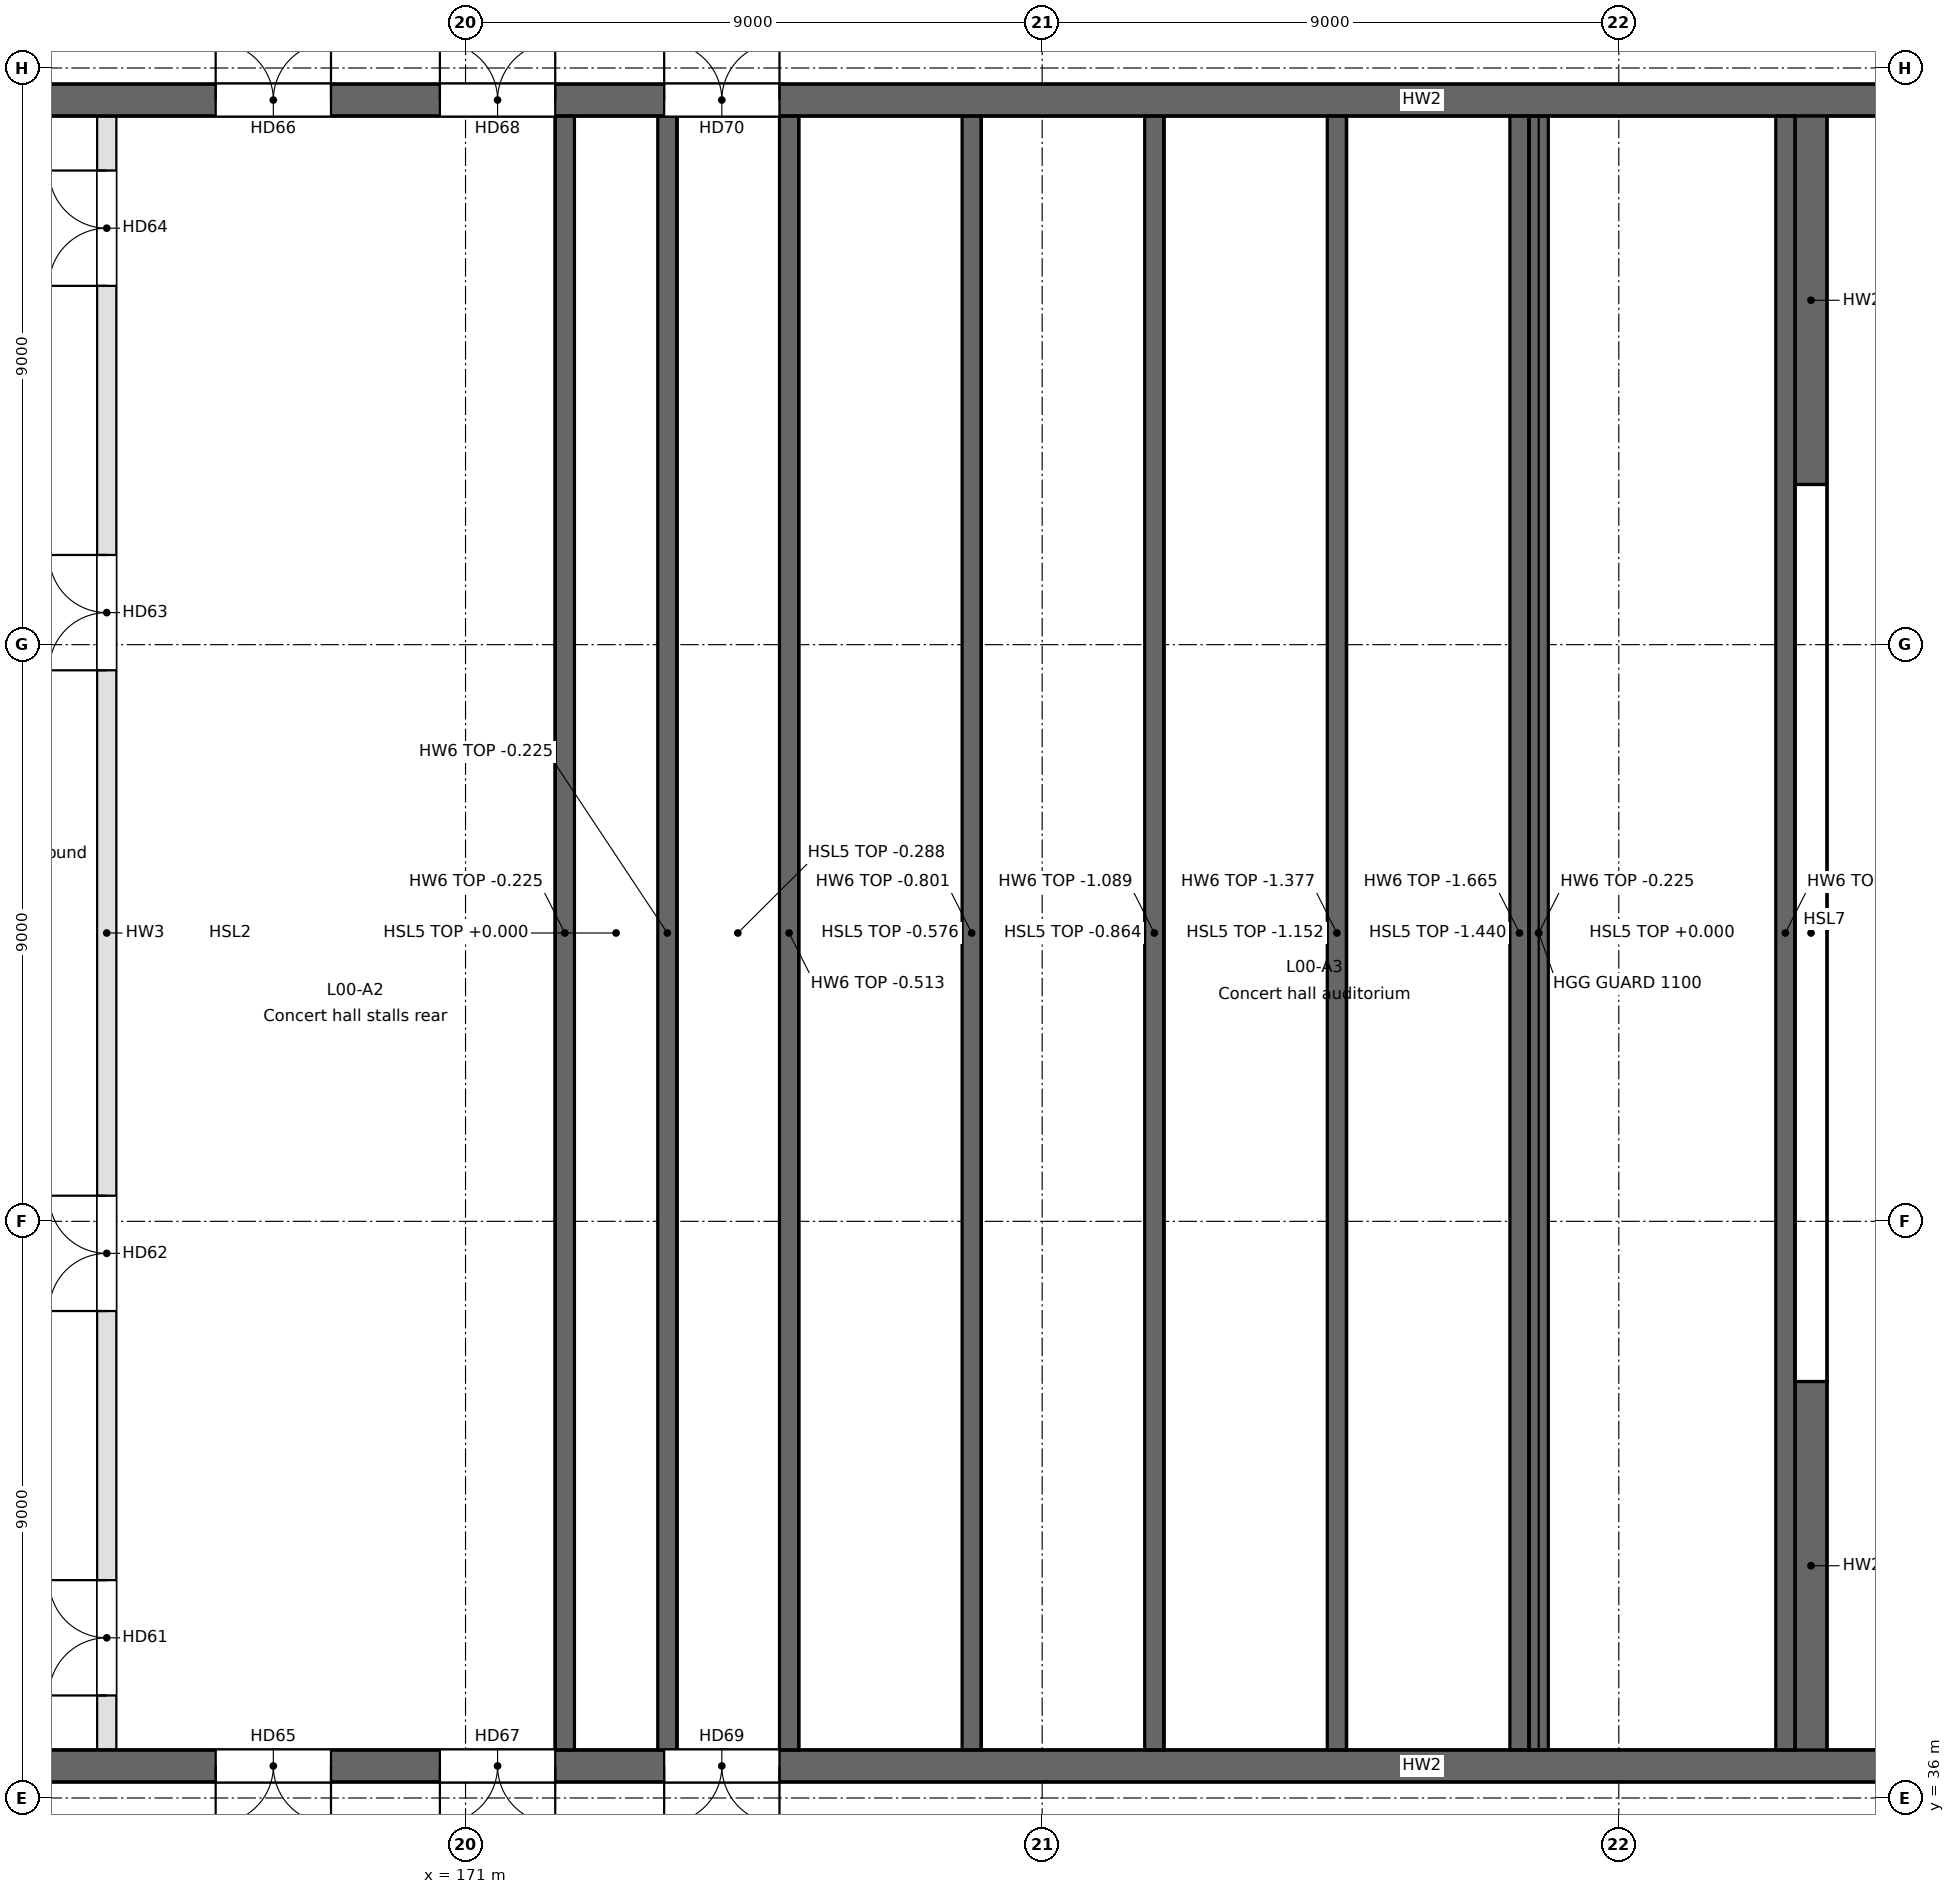
"""IFC4 building model, lengths in metres.
Left out: names, types, materials, properties, quantities, classifications, styles, units other than length and angle.
Written with IfcOpenShell. Run it as: python <this file> out.ifc"""

import sys

from ifc_helpers import new_model, si_unit, direction, frame, frame_2d, origin, place, context, subcontext, project, spatial, rectangle, extrude, element, fill, save


model = new_model("IFC4")
c1 = context("Model", 3, precision=1e-05, world=origin(), true_north=direction((0.0, 1.0)))
c2 = subcontext(c1, "Body", "Model", "MODEL_VIEW")
j1 = project(units=[si_unit("LENGTHUNIT", "METRE"), si_unit("PLANEANGLEUNIT", "RADIAN")], contexts=[c1])
p1 = place(None, origin())
s1 = spatial("IfcSite", under=j1, at=p1, CompositionType="ELEMENT")
p2 = place(p1, origin())
s2 = spatial("IfcBuilding", under=s1, at=p2, CompositionType="ELEMENT")
p3 = place(p2, origin())
s3 = spatial("IfcBuildingStorey", under=s2, at=p3, CompositionType="ELEMENT", Elevation=0.0)
p4 = place(p3, frame((209.6, 36.5, -1.8), z_axis=(0.0, 0.0, 1.0), x_axis=(-1.0, 0.0, 0.0)))
e1 = element("IfcWall", 1, at=p4, inside=s3, PredefinedType="SOLIDWALL", context=c2, shape_type="SweptSolid", body=[
    extrude(rectangle(XDim=47.35, YDim=0.5, at=frame_2d((23.675, 0.0))), origin(), (0.0, 0.0, 1.0), 7.45),
])
p5 = place(p4, frame((40.7, 0.0, 1.8)))
e2 = element("IfcOpeningElement", 2, at=p5, cuts=e1, PredefinedType="OPENING", context=c2, shape_type="SweptSolid", body=[
    extrude(rectangle(XDim=1.8, YDim=2.4, at=frame_2d((0.9, 1.2))), frame((0.0, 0.25, 0.0), z_axis=(0.0, -1.0, 0.0), x_axis=(1.0, 0.0, 0.0)), (0.0, 0.0, 1.0), 0.5),
])
p6 = place(p4, frame((37.2, 0.0, 1.8)))
e3 = element("IfcOpeningElement", 3, at=p6, cuts=e1, PredefinedType="OPENING", context=c2, shape_type="SweptSolid", body=[
    extrude(rectangle(XDim=1.8, YDim=2.4, at=frame_2d((0.9, 1.2))), frame((0.0, 0.25, 0.0), z_axis=(0.0, -1.0, 0.0), x_axis=(1.0, 0.0, 0.0)), (0.0, 0.0, 1.0), 0.5),
])
p7 = place(p4, frame((33.7, 0.0, 1.8)))
e4 = element("IfcOpeningElement", 4, at=p7, cuts=e1, PredefinedType="OPENING", context=c2, shape_type="SweptSolid", body=[
    extrude(rectangle(XDim=1.8, YDim=2.4, at=frame_2d((0.9, 1.2))), frame((0.0, 0.25, 0.0), z_axis=(0.0, -1.0, 0.0), x_axis=(1.0, 0.0, 0.0)), (0.0, 0.0, 1.0), 0.5),
])
p8 = place(p4, frame((12.7, 0.0, 1.8)))
e5 = element("IfcOpeningElement", 5, at=p8, cuts=e1, PredefinedType="OPENING", context=c2, shape_type="SweptSolid", body=[
    extrude(rectangle(XDim=1.8, YDim=2.1, at=frame_2d((0.9, 1.05))), frame((0.0, 0.25, 0.0), z_axis=(0.0, -1.0, 0.0), x_axis=(1.0, 0.0, 0.0)), (0.0, 0.0, 1.0), 0.5),
])
p9 = place(p4, frame((4.7, 0.0, 1.8)))
e6 = element("IfcOpeningElement", 6, at=p9, cuts=e1, PredefinedType="OPENING", context=c2, shape_type="SweptSolid", body=[
    extrude(rectangle(XDim=1.8, YDim=2.1, at=frame_2d((0.9, 1.05))), frame((0.0, 0.25, 0.0), z_axis=(0.0, -1.0, 0.0), x_axis=(1.0, 0.0, 0.0)), (0.0, 0.0, 1.0), 0.5),
])
p10 = place(p3, frame((162.25, 62.5, -1.8), z_axis=(0.0, 0.0, 1.0), x_axis=(1.0, 0.0, 0.0)))
e7 = element("IfcWall", 7, at=p10, inside=s3, PredefinedType="SOLIDWALL", context=c2, shape_type="SweptSolid", body=[
    extrude(rectangle(XDim=47.35, YDim=0.5, at=frame_2d((23.675, 0.0))), origin(), (0.0, 0.0, 1.0), 7.45),
])
p11 = place(p10, frame((4.85, 0.0, 1.8)))
e8 = element("IfcOpeningElement", 8, at=p11, cuts=e7, PredefinedType="OPENING", context=c2, shape_type="SweptSolid", body=[
    extrude(rectangle(XDim=1.8, YDim=2.4, at=frame_2d((0.9, 1.2))), frame((0.0, 0.25, 0.0), z_axis=(0.0, -1.0, 0.0), x_axis=(1.0, 0.0, 0.0)), (0.0, 0.0, 1.0), 0.5),
])
p12 = place(p10, frame((8.35, 0.0, 1.8)))
e9 = element("IfcOpeningElement", 9, at=p12, cuts=e7, PredefinedType="OPENING", context=c2, shape_type="SweptSolid", body=[
    extrude(rectangle(XDim=1.8, YDim=2.4, at=frame_2d((0.9, 1.2))), frame((0.0, 0.25, 0.0), z_axis=(0.0, -1.0, 0.0), x_axis=(1.0, 0.0, 0.0)), (0.0, 0.0, 1.0), 0.5),
])
p13 = place(p10, frame((11.85, 0.0, 1.8)))
e10 = element("IfcOpeningElement", 10, at=p13, cuts=e7, PredefinedType="OPENING", context=c2, shape_type="SweptSolid", body=[
    extrude(rectangle(XDim=1.8, YDim=2.4, at=frame_2d((0.9, 1.2))), frame((0.0, 0.25, 0.0), z_axis=(0.0, -1.0, 0.0), x_axis=(1.0, 0.0, 0.0)), (0.0, 0.0, 1.0), 0.5),
])
p14 = place(p10, frame((32.85, 0.0, 1.8)))
e11 = element("IfcOpeningElement", 11, at=p14, cuts=e7, PredefinedType="OPENING", context=c2, shape_type="SweptSolid", body=[
    extrude(rectangle(XDim=1.8, YDim=2.1, at=frame_2d((0.9, 1.05))), frame((0.0, 0.25, 0.0), z_axis=(0.0, -1.0, 0.0), x_axis=(1.0, 0.0, 0.0)), (0.0, 0.0, 1.0), 0.5),
])
p15 = place(p10, frame((40.85, 0.0, 1.8)))
e12 = element("IfcOpeningElement", 12, at=p15, cuts=e7, PredefinedType="OPENING", context=c2, shape_type="SweptSolid", body=[
    extrude(rectangle(XDim=1.8, YDim=2.1, at=frame_2d((0.9, 1.05))), frame((0.0, 0.25, 0.0), z_axis=(0.0, -1.0, 0.0), x_axis=(1.0, 0.0, 0.0)), (0.0, 0.0, 1.0), 0.5),
])
for number, where, z_axis, x_axis in (
    (13, (192.0, 36.75, -1.8), (0.0, 0.0, 1.0), (0.0, 1.0, 0.0)),
    (14, (192.0, 56.5, -1.8), (0.0, 0.0, 1.0), (0.0, 1.0, 0.0)),
):
    element("IfcWall", number, at=place(p3, frame(where, z_axis=z_axis, x_axis=x_axis)), inside=s3, PredefinedType="SOLIDWALL", context=c2, shape_type="SweptSolid", body=[
        extrude(rectangle(XDim=5.75, YDim=0.5, at=frame_2d((2.875, 0.0))), origin(), (0.0, 0.0, 1.0), 7.45),
    ])
p16 = place(p3, frame((165.4, 36.75, 0.0), z_axis=(0.0, 0.0, 1.0), x_axis=(0.0, 1.0, 0.0)))
e15 = element("IfcWall", 15, at=p16, inside=s3, PredefinedType="PARTITIONING", context=c2, shape_type="SweptSolid", body=[
    extrude(rectangle(XDim=25.5, YDim=0.3, at=frame_2d((12.75, 0.0))), origin(), (0.0, 0.0, 1.0), 5.65),
])
p17 = place(p16, frame((0.85, 0.0, 0.0)))
e16 = element("IfcOpeningElement", 16, at=p17, cuts=e15, PredefinedType="OPENING", context=c2, shape_type="SweptSolid", body=[
    extrude(rectangle(XDim=1.8, YDim=2.4, at=frame_2d((0.9, 1.2))), frame((0.0, 0.15, 0.0), z_axis=(0.0, -1.0, 0.0), x_axis=(1.0, 0.0, 0.0)), (0.0, 0.0, 1.0), 0.3),
])
p18 = place(p16, frame((6.85, 0.0, 0.0)))
e17 = element("IfcOpeningElement", 17, at=p18, cuts=e15, PredefinedType="OPENING", context=c2, shape_type="SweptSolid", body=[
    extrude(rectangle(XDim=1.8, YDim=2.4, at=frame_2d((0.9, 1.2))), frame((0.0, 0.15, 0.0), z_axis=(0.0, -1.0, 0.0), x_axis=(1.0, 0.0, 0.0)), (0.0, 0.0, 1.0), 0.3),
])
p19 = place(p16, frame((16.85, 0.0, 0.0)))
e18 = element("IfcOpeningElement", 18, at=p19, cuts=e15, PredefinedType="OPENING", context=c2, shape_type="SweptSolid", body=[
    extrude(rectangle(XDim=1.8, YDim=2.4, at=frame_2d((0.9, 1.2))), frame((0.0, 0.15, 0.0), z_axis=(0.0, -1.0, 0.0), x_axis=(1.0, 0.0, 0.0)), (0.0, 0.0, 1.0), 0.3),
])
p20 = place(p16, frame((22.85, 0.0, 0.0)))
e19 = element("IfcOpeningElement", 19, at=p20, cuts=e15, PredefinedType="OPENING", context=c2, shape_type="SweptSolid", body=[
    extrude(rectangle(XDim=1.8, YDim=2.4, at=frame_2d((0.9, 1.2))), frame((0.0, 0.15, 0.0), z_axis=(0.0, -1.0, 0.0), x_axis=(1.0, 0.0, 0.0)), (0.0, 0.0, 1.0), 0.3),
])
p21 = place(p3, frame((187.45, 36.75, -1.8), z_axis=(0.0, 0.0, 1.0), x_axis=(0.0, 1.0, 0.0)))
e20 = element("IfcWall", 20, at=p21, inside=s3, PredefinedType="SOLIDWALL", context=c2, shape_type="SweptSolid", body=[
    extrude(rectangle(XDim=25.5, YDim=0.3, at=frame_2d((12.75, 0.0))), origin(), (0.0, 0.0, 1.0), 0.135),
])
p22 = place(p3, frame((184.6, 36.75, -1.8), z_axis=(0.0, 0.0, 1.0), x_axis=(0.0, 1.0, 0.0)))
e21 = element("IfcWall", 21, at=p22, inside=s3, PredefinedType="SOLIDWALL", context=c2, shape_type="SweptSolid", body=[
    extrude(rectangle(XDim=25.5, YDim=0.3, at=frame_2d((12.75, 0.0))), origin(), (0.0, 0.0, 1.0), 0.423),
])
p23 = place(p3, frame((181.75, 36.75, -1.8), z_axis=(0.0, 0.0, 1.0), x_axis=(0.0, 1.0, 0.0)))
e22 = element("IfcWall", 22, at=p23, inside=s3, PredefinedType="SOLIDWALL", context=c2, shape_type="SweptSolid", body=[
    extrude(rectangle(XDim=25.5, YDim=0.3, at=frame_2d((12.75, 0.0))), origin(), (0.0, 0.0, 1.0), 0.711),
])
p24 = place(p3, frame((178.9, 36.75, -1.8), z_axis=(0.0, 0.0, 1.0), x_axis=(0.0, 1.0, 0.0)))
e23 = element("IfcWall", 23, at=p24, inside=s3, PredefinedType="SOLIDWALL", context=c2, shape_type="SweptSolid", body=[
    extrude(rectangle(XDim=25.5, YDim=0.3, at=frame_2d((12.75, 0.0))), origin(), (0.0, 0.0, 1.0), 0.999),
])
p25 = place(p3, frame((176.05, 36.75, -1.8), z_axis=(0.0, 0.0, 1.0), x_axis=(0.0, 1.0, 0.0)))
e24 = element("IfcWall", 24, at=p25, inside=s3, PredefinedType="SOLIDWALL", context=c2, shape_type="SweptSolid", body=[
    extrude(rectangle(XDim=25.5, YDim=0.3, at=frame_2d((12.75, 0.0))), origin(), (0.0, 0.0, 1.0), 1.287),
])
for number, where, z_axis, x_axis in (
    (25, (174.15, 36.75, -1.8), (0.0, 0.0, 1.0), (0.0, 1.0, 0.0)),
    (26, (172.55, 36.75, -1.8), (0.0, 0.0, 1.0), (0.0, 1.0, 0.0)),
    (27, (191.6, 36.75, -1.8), (0.0, 0.0, 1.0), (0.0, 1.0, 0.0)),
    (28, (187.75, 36.75, -1.8), (0.0, 0.0, 1.0), (0.0, 1.0, 0.0)),
):
    element("IfcWall", number, at=place(p3, frame(where, z_axis=z_axis, x_axis=x_axis)), inside=s3, PredefinedType="SOLIDWALL", context=c2, shape_type="SweptSolid", body=[
        extrude(rectangle(XDim=25.5, YDim=0.3, at=frame_2d((12.75, 0.0))), origin(), (0.0, 0.0, 1.0), 1.575),
    ])
p26 = place(p17, origin())
e29 = element("IfcDoor", 29, at=p26, inside=s3, OperationType="DOUBLE_DOOR_SINGLE_SWING", PredefinedType="DOOR", context=c2, shape_type="SweptSolid", body=[
    extrude(rectangle(XDim=1.8, YDim=2.4, at=frame_2d((0.9, 1.2))), frame((0.0, 0.025, 0.0), z_axis=(0.0, -1.0, 0.0), x_axis=(1.0, 0.0, 0.0)), (0.0, 0.0, 1.0), 0.05),
])
fill(e16, e29)
p27 = place(p18, origin())
e30 = element("IfcDoor", 30, at=p27, inside=s3, OperationType="DOUBLE_DOOR_SINGLE_SWING", PredefinedType="DOOR", context=c2, shape_type="SweptSolid", body=[
    extrude(rectangle(XDim=1.8, YDim=2.4, at=frame_2d((0.9, 1.2))), frame((0.0, 0.025, 0.0), z_axis=(0.0, -1.0, 0.0), x_axis=(1.0, 0.0, 0.0)), (0.0, 0.0, 1.0), 0.05),
])
fill(e17, e30)
p28 = place(p19, origin())
e31 = element("IfcDoor", 31, at=p28, inside=s3, OperationType="DOUBLE_DOOR_SINGLE_SWING", PredefinedType="DOOR", context=c2, shape_type="SweptSolid", body=[
    extrude(rectangle(XDim=1.8, YDim=2.4, at=frame_2d((0.9, 1.2))), frame((0.0, 0.025, 0.0), z_axis=(0.0, -1.0, 0.0), x_axis=(1.0, 0.0, 0.0)), (0.0, 0.0, 1.0), 0.05),
])
fill(e18, e31)
p29 = place(p20, origin())
e32 = element("IfcDoor", 32, at=p29, inside=s3, OperationType="DOUBLE_DOOR_SINGLE_SWING", PredefinedType="DOOR", context=c2, shape_type="SweptSolid", body=[
    extrude(rectangle(XDim=1.8, YDim=2.4, at=frame_2d((0.9, 1.2))), frame((0.0, 0.025, 0.0), z_axis=(0.0, -1.0, 0.0), x_axis=(1.0, 0.0, 0.0)), (0.0, 0.0, 1.0), 0.05),
])
fill(e19, e32)
p30 = place(p5, origin())
e33 = element("IfcDoor", 33, at=p30, inside=s3, OperationType="DOUBLE_DOOR_SINGLE_SWING", PredefinedType="DOOR", context=c2, shape_type="SweptSolid", body=[
    extrude(rectangle(XDim=1.8, YDim=2.4, at=frame_2d((0.9, 1.2))), frame((0.0, 0.025, 0.0), z_axis=(0.0, -1.0, 0.0), x_axis=(1.0, 0.0, 0.0)), (0.0, 0.0, 1.0), 0.05),
])
fill(e2, e33)
p31 = place(p11, origin())
e34 = element("IfcDoor", 34, at=p31, inside=s3, OperationType="DOUBLE_DOOR_SINGLE_SWING", PredefinedType="DOOR", context=c2, shape_type="SweptSolid", body=[
    extrude(rectangle(XDim=1.8, YDim=2.4, at=frame_2d((0.9, 1.2))), frame((0.0, 0.025, 0.0), z_axis=(0.0, -1.0, 0.0), x_axis=(1.0, 0.0, 0.0)), (0.0, 0.0, 1.0), 0.05),
])
fill(e8, e34)
p32 = place(p6, origin())
e35 = element("IfcDoor", 35, at=p32, inside=s3, OperationType="DOUBLE_DOOR_SINGLE_SWING", PredefinedType="DOOR", context=c2, shape_type="SweptSolid", body=[
    extrude(rectangle(XDim=1.8, YDim=2.4, at=frame_2d((0.9, 1.2))), frame((0.0, 0.025, 0.0), z_axis=(0.0, -1.0, 0.0), x_axis=(1.0, 0.0, 0.0)), (0.0, 0.0, 1.0), 0.05),
])
fill(e3, e35)
p33 = place(p12, origin())
e36 = element("IfcDoor", 36, at=p33, inside=s3, OperationType="DOUBLE_DOOR_SINGLE_SWING", PredefinedType="DOOR", context=c2, shape_type="SweptSolid", body=[
    extrude(rectangle(XDim=1.8, YDim=2.4, at=frame_2d((0.9, 1.2))), frame((0.0, 0.025, 0.0), z_axis=(0.0, -1.0, 0.0), x_axis=(1.0, 0.0, 0.0)), (0.0, 0.0, 1.0), 0.05),
])
fill(e9, e36)
p34 = place(p7, origin())
e37 = element("IfcDoor", 37, at=p34, inside=s3, OperationType="DOUBLE_DOOR_SINGLE_SWING", PredefinedType="DOOR", context=c2, shape_type="SweptSolid", body=[
    extrude(rectangle(XDim=1.8, YDim=2.4, at=frame_2d((0.9, 1.2))), frame((0.0, 0.025, 0.0), z_axis=(0.0, -1.0, 0.0), x_axis=(1.0, 0.0, 0.0)), (0.0, 0.0, 1.0), 0.05),
])
fill(e4, e37)
p35 = place(p13, origin())
e38 = element("IfcDoor", 38, at=p35, inside=s3, OperationType="DOUBLE_DOOR_SINGLE_SWING", PredefinedType="DOOR", context=c2, shape_type="SweptSolid", body=[
    extrude(rectangle(XDim=1.8, YDim=2.4, at=frame_2d((0.9, 1.2))), frame((0.0, 0.025, 0.0), z_axis=(0.0, -1.0, 0.0), x_axis=(1.0, 0.0, 0.0)), (0.0, 0.0, 1.0), 0.05),
])
fill(e10, e38)
save(model, sys.argv[1])
